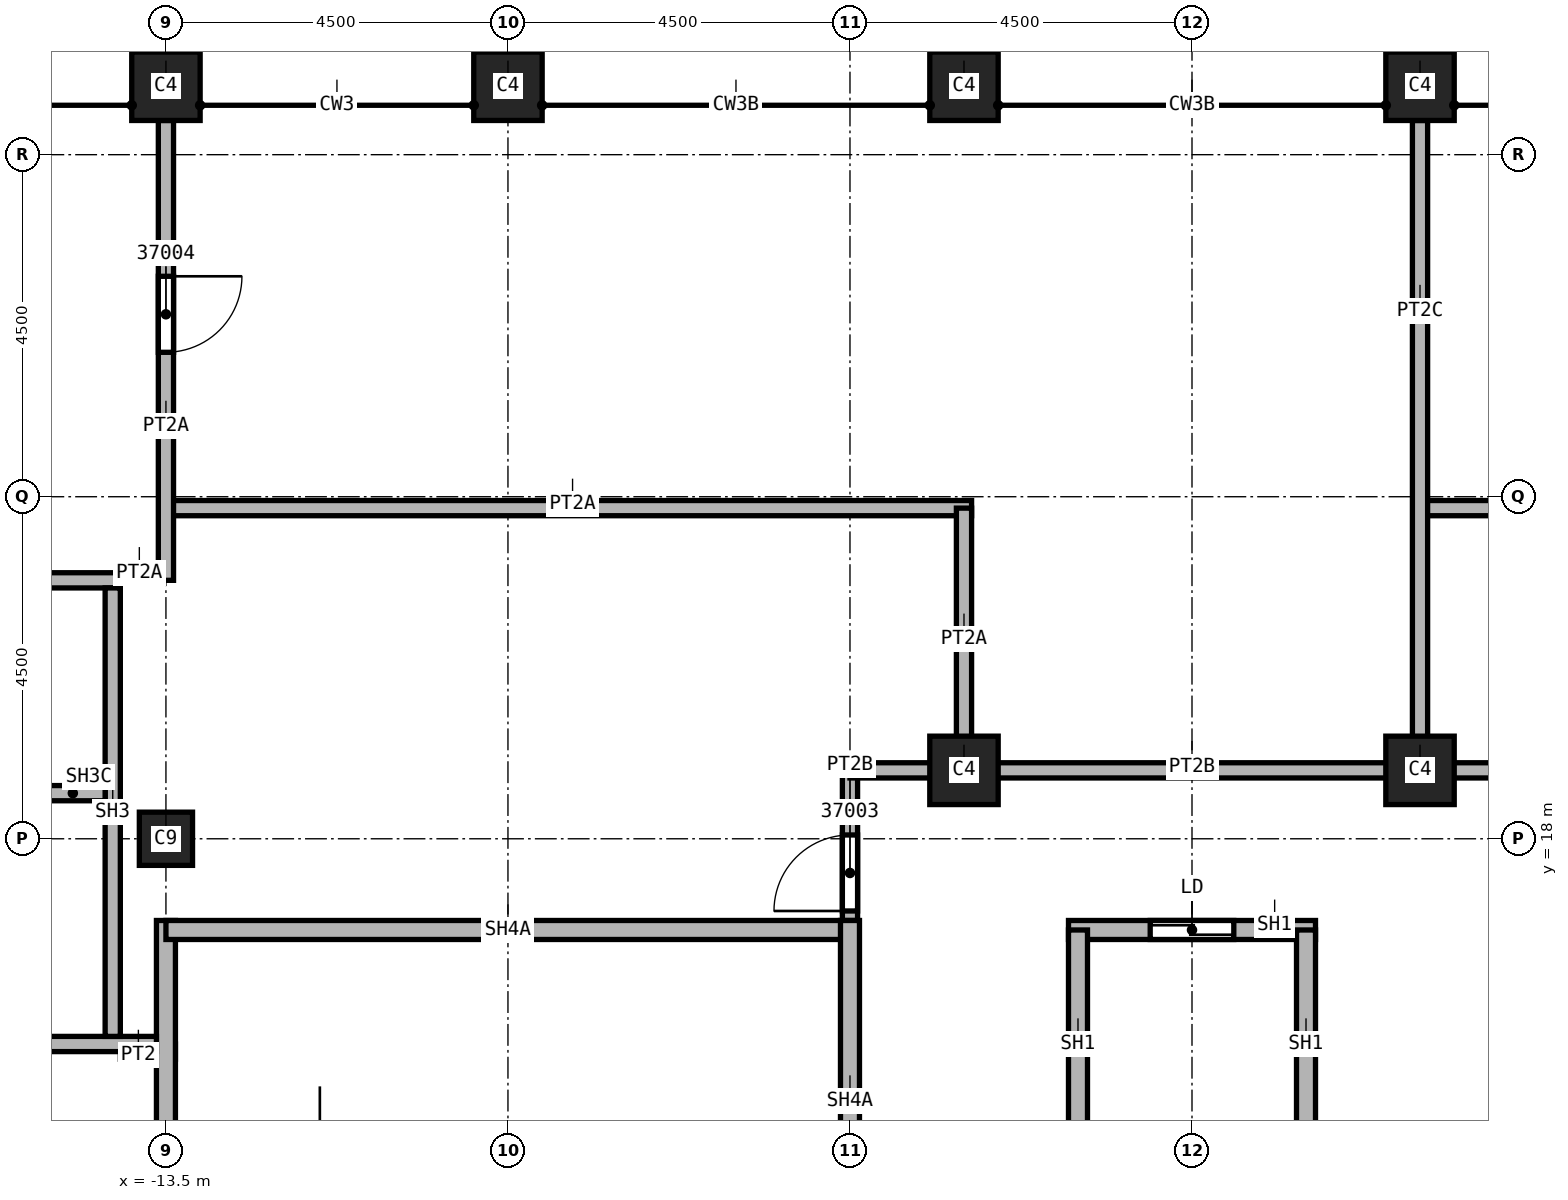
"""IFC4 building model, lengths in metres.
Left out: names, types, materials, properties, quantities, classifications, styles, units other than length and angle.
Written with IfcOpenShell. Run it as: python <this file> out.ifc"""

import sys

from ifc_helpers import new_model, si_unit, direction, frame, frame_2d, origin, origin_2d, place, context, subcontext, project, spatial, rectangle, extrude, element, fill, save


model = new_model("IFC4")
c1 = context("Model", 3, precision=1e-05, world=origin(), true_north=direction((0.0, 1.0)))
c2 = subcontext(c1, "Body", "Model", "MODEL_VIEW")
j1 = project(units=[si_unit("LENGTHUNIT", "METRE"), si_unit("PLANEANGLEUNIT", "RADIAN")], contexts=[c1])
p1 = place(None, origin())
s1 = spatial("IfcSite", under=j1, at=p1, CompositionType="ELEMENT")
p2 = place(p1, origin())
s2 = spatial("IfcBuilding", under=s1, at=p2, CompositionType="ELEMENT")
p3 = place(p2, frame((0.0, 0.0, 386.0)))
s3 = spatial("IfcBuildingStorey", under=s2, at=p3, CompositionType="ELEMENT", Elevation=386.0)
p4 = place(p3, frame((-13.5, 18.0, 0.0), z_axis=(0.0, 0.0, 1.0), x_axis=(1.0, 0.0, 0.0)))
e1 = element("IfcColumn", 1, at=p4, inside=s3, PredefinedType="COLUMN", context=c2, shape_type="SweptSolid", body=[
    extrude(rectangle(XDim=0.7, YDim=0.7, at=origin_2d()), origin(), (0.0, 0.0, 1.0), 5.0),
])
for number, where, z_axis, x_axis in (
    (2, (3.0, 27.9, 0.0), (0.0, 0.0, 1.0), (1.0, 0.0, 0.0)),
    (3, (-3.0, 27.9, 0.0), (0.0, 0.0, 1.0), (1.0, 0.0, 0.0)),
    (4, (-9.0, 27.9, 0.0), (0.0, 0.0, 1.0), (1.0, 0.0, 0.0)),
    (5, (-13.5, 27.9, 0.0), (0.0, 0.0, 1.0), (1.0, 0.0, 0.0)),
    (6, (3.0, 18.9, 0.0), (0.0, 0.0, 1.0), (1.0, 0.0, 0.0)),
    (7, (-3.0, 18.9, 0.0), (0.0, 0.0, 1.0), (1.0, 0.0, 0.0)),
):
    element("IfcColumn", number, at=place(p3, frame(where, z_axis=z_axis, x_axis=x_axis)), inside=s3, PredefinedType="COLUMN", context=c2, shape_type="SweptSolid", body=[
        extrude(rectangle(XDim=0.9, YDim=0.9, at=origin_2d()), origin(), (0.0, 0.0, 1.0), 5.0),
    ])
p5 = place(p3, frame((-14.1, 15.2, 0.0), z_axis=(0.0, 0.0, 1.0), x_axis=(1.0, 0.0, 0.0)))
e8 = element("IfcWall", 8, at=p5, inside=s3, PredefinedType="PARTITIONING", context=c2, shape_type="SweptSolid", body=[
    extrude(rectangle(XDim=0.725, YDim=0.2, at=frame_2d((0.363, 0.0))), origin(), (0.0, 0.0, 1.0), 2.953),
])
p6 = place(p3, frame((-13.5, 21.5, 0.0), z_axis=(0.0, 0.0, 1.0), x_axis=(-1.0, 0.0, 0.0)))
e9 = element("IfcWall", 9, at=p6, inside=s3, PredefinedType="PARTITIONING", context=c2, shape_type="SweptSolid", body=[
    extrude(rectangle(XDim=0.6, YDim=0.2, at=frame_2d((0.3, 0.0))), origin(), (0.0, 0.0, 1.0), 5.632),
])
p7 = place(p3, frame((-13.5, 22.35, 0.0), z_axis=(0.0, 0.0, 1.0), x_axis=(1.0, 0.0, 0.0)))
e10 = element("IfcWall", 10, at=p7, inside=s3, PredefinedType="PARTITIONING", context=c2, shape_type="SweptSolid", body=[
    extrude(rectangle(XDim=10.6, YDim=0.2, at=frame_2d((5.3, 0.0))), origin(), (0.0, 0.0, 1.0), 5.632),
])
p8 = place(p3, frame((-13.5, 27.45, 0.0), z_axis=(0.0, 0.0, 1.0), x_axis=(0.0, -1.0, 0.0)))
e11 = element("IfcWall", 11, at=p8, inside=s3, PredefinedType="PARTITIONING", context=c2, shape_type="SweptSolid", body=[
    extrude(rectangle(XDim=6.05, YDim=0.2, at=frame_2d((3.025, 0.0))), origin(), (0.0, 0.0, 1.0), 5.632),
])
p9 = place(p8, frame((2.05, 0.0, 0.0)))
e12 = element("IfcOpeningElement", 12, at=p9, cuts=e11, PredefinedType="OPENING", context=c2, shape_type="SweptSolid", body=[
    extrude(rectangle(XDim=1.0, YDim=2.1, at=frame_2d((0.5, 1.05))), frame((0.0, 0.1, 0.0), z_axis=(0.0, -1.0, 0.0), x_axis=(1.0, 0.0, 0.0)), (0.0, 0.0, 1.0), 0.2),
])
p10 = place(p3, frame((-4.5, 16.8, 0.0), z_axis=(0.0, 0.0, 1.0), x_axis=(0.0, 1.0, 0.0)))
e13 = element("IfcWall", 13, at=p10, inside=s3, PredefinedType="PARTITIONING", context=c2, shape_type="SweptSolid", body=[
    extrude(rectangle(XDim=2.2, YDim=0.2, at=frame_2d((1.1, 0.0))), origin(), (0.0, 0.0, 1.0), 4.281),
])
p11 = place(p10, frame((0.25, 0.0, 0.0)))
e14 = element("IfcOpeningElement", 14, at=p11, cuts=e13, PredefinedType="OPENING", context=c2, shape_type="SweptSolid", body=[
    extrude(rectangle(XDim=1.0, YDim=2.1, at=frame_2d((0.5, 1.05))), frame((0.0, 0.1, 0.0), z_axis=(0.0, -1.0, 0.0), x_axis=(1.0, 0.0, 0.0)), (0.0, 0.0, 1.0), 0.2),
])
p12 = place(p3, frame((-4.5, 18.9, 0.0), z_axis=(0.0, 0.0, 1.0), x_axis=(1.0, 0.0, 0.0)))
e15 = element("IfcWall", 15, at=p12, inside=s3, PredefinedType="PARTITIONING", context=c2, shape_type="SweptSolid", body=[
    extrude(rectangle(XDim=9.1, YDim=0.2, at=frame_2d((4.55, 0.0))), origin(), (0.0, 0.0, 1.0), 4.281),
])
p13 = place(p3, frame((-3.0, 22.35, 0.0), z_axis=(0.0, 0.0, 1.0), x_axis=(0.0, -1.0, 0.0)))
e16 = element("IfcWall", 16, at=p13, inside=s3, PredefinedType="PARTITIONING", context=c2, shape_type="SweptSolid", body=[
    extrude(rectangle(XDim=3.45, YDim=0.2, at=frame_2d((1.725, 0.0))), origin(), (0.0, 0.0, 1.0), 5.632),
])
p14 = place(p3, frame((3.0, 22.35, 0.0), z_axis=(0.0, 0.0, 1.0), x_axis=(1.0, 0.0, 0.0)))
e17 = element("IfcWall", 17, at=p14, inside=s3, PredefinedType="PARTITIONING", context=c2, shape_type="SweptSolid", body=[
    extrude(rectangle(XDim=10.5, YDim=0.2, at=frame_2d((5.25, 0.0))), origin(), (0.0, 0.0, 1.0), 6.378),
])
p15 = place(p3, frame((3.0, 27.45, 0.0), z_axis=(0.0, 0.0, 1.0), x_axis=(0.0, -1.0, 0.0)))
e18 = element("IfcWall", 18, at=p15, inside=s3, PredefinedType="PARTITIONING", context=c2, shape_type="SweptSolid", body=[
    extrude(rectangle(XDim=8.55, YDim=0.2, at=frame_2d((4.275, 0.0))), origin(), (0.0, 0.0, 1.0), 6.378),
])
p16 = place(p3, frame((-1.625, 16.8, 0.0), z_axis=(0.0, 0.0, 1.0), x_axis=(1.0, 0.0, 0.0)))
e19 = element("IfcWall", 19, at=p16, inside=s3, PredefinedType="SOLIDWALL", context=c2, shape_type="SweptSolid", body=[
    extrude(rectangle(XDim=3.25, YDim=0.25, at=frame_2d((1.625, 0.0))), origin(), (0.0, 0.0, 1.0), 4.281),
])
p17 = place(p16, frame((1.075, 0.0, 0.0)))
e20 = element("IfcOpeningElement", 20, at=p17, cuts=e19, PredefinedType="OPENING", context=c2, shape_type="SweptSolid", body=[
    extrude(rectangle(XDim=1.1, YDim=2.1, at=frame_2d((0.55, 1.05))), frame((0.0, 0.125, 0.0), z_axis=(0.0, -1.0, 0.0), x_axis=(1.0, 0.0, 0.0)), (0.0, 0.0, 1.0), 0.25),
])
p18 = place(p3, frame((-1.5, 13.8, 0.0), z_axis=(0.0, 0.0, 1.0), x_axis=(0.0, 1.0, 0.0)))
e21 = element("IfcWall", 21, at=p18, inside=s3, PredefinedType="SOLIDWALL", context=c2, shape_type="SweptSolid", body=[
    extrude(rectangle(XDim=3.0, YDim=0.25, at=frame_2d((1.5, 0.0))), origin(), (0.0, 0.0, 1.0), 4.281),
])
p19 = place(p3, frame((1.5, 16.8, 0.0), z_axis=(0.0, 0.0, 1.0), x_axis=(0.0, -1.0, 0.0)))
e22 = element("IfcWall", 22, at=p19, inside=s3, PredefinedType="SOLIDWALL", context=c2, shape_type="SweptSolid", body=[
    extrude(rectangle(XDim=3.125, YDim=0.25, at=frame_2d((1.562, 0.0))), origin(), (0.0, 0.0, 1.0), 4.281),
])
p20 = place(p3, frame((-13.5, 12.175, 0.0), z_axis=(0.0, 0.0, 1.0), x_axis=(0.0, 1.0, 0.0)))
e23 = element("IfcWall", 23, at=p20, inside=s3, PredefinedType="SOLIDWALL", context=c2, shape_type="SweptSolid", body=[
    extrude(rectangle(XDim=4.75, YDim=0.25, at=frame_2d((2.375, 0.0))), origin(), (0.0, 0.0, 1.0), 2.953),
])
p21 = place(p3, frame((-13.5, 16.8, 0.0), z_axis=(0.0, 0.0, 1.0), x_axis=(1.0, 0.0, 0.0)))
e24 = element("IfcWall", 24, at=p21, inside=s3, PredefinedType="SOLIDWALL", context=c2, shape_type="SweptSolid", body=[
    extrude(rectangle(XDim=9.1, YDim=0.25, at=frame_2d((4.55, 0.0))), origin(), (0.0, 0.0, 1.0), 4.281),
])
p22 = place(p3, frame((-4.5, 16.925, 0.0), z_axis=(0.0, 0.0, 1.0), x_axis=(0.0, -1.0, 0.0)))
e25 = element("IfcWall", 25, at=p22, inside=s3, PredefinedType="SOLIDWALL", context=c2, shape_type="SweptSolid", body=[
    extrude(rectangle(XDim=4.625, YDim=0.25, at=frame_2d((2.312, 0.0))), origin(), (0.0, 0.0, 1.0), 4.281),
])
p23 = place(p3, frame((-21.9, 15.3, 0.0), z_axis=(0.0, 0.0, 1.0), x_axis=(1.0, 0.0, 0.0)))
e26 = element("IfcWall", 26, at=p23, inside=s3, PredefinedType="SOLIDWALL", context=c2, shape_type="SweptSolid", body=[
    extrude(rectangle(XDim=8.275, YDim=0.2, at=frame_2d((4.137, 0.0))), origin(), (0.0, 0.0, 1.0), 5.679),
])
p24 = place(p23, frame((4.8, 0.0, 0.0)))
e27 = element("IfcOpeningElement", 27, at=p24, cuts=e26, PredefinedType="OPENING", context=c2, shape_type="SweptSolid", body=[
    extrude(rectangle(XDim=1.2, YDim=2.1, at=frame_2d((0.6, 1.05))), frame((0.0, 0.1, 0.0), z_axis=(0.0, -1.0, 0.0), x_axis=(1.0, 0.0, 0.0)), (0.0, 0.0, 1.0), 0.2),
])
p25 = place(p3, frame((-21.9, 21.4, 0.0), z_axis=(0.0, 0.0, 1.0), x_axis=(1.0, 0.0, 0.0)))
e28 = element("IfcWall", 28, at=p25, inside=s3, PredefinedType="SOLIDWALL", context=c2, shape_type="SweptSolid", body=[
    extrude(rectangle(XDim=7.8, YDim=0.2, at=frame_2d((3.9, 0.0))), origin(), (0.0, 0.0, 1.0), 8.521),
])
p26 = place(p25, frame((3.2, 0.0, 0.0)))
e29 = element("IfcOpeningElement", 29, at=p26, cuts=e28, PredefinedType="OPENING", context=c2, shape_type="SweptSolid", body=[
    extrude(rectangle(XDim=1.2, YDim=2.1, at=frame_2d((0.6, 1.05))), frame((0.0, 0.1, 0.0), z_axis=(0.0, -1.0, 0.0), x_axis=(1.0, 0.0, 0.0)), (0.0, 0.0, 1.0), 0.2),
])
p27 = place(p3, frame((-14.2, 15.4, 0.0), z_axis=(0.0, 0.0, 1.0), x_axis=(0.0, 1.0, 0.0)))
e30 = element("IfcWall", 30, at=p27, inside=s3, PredefinedType="SOLIDWALL", context=c2, shape_type="SweptSolid", body=[
    extrude(rectangle(XDim=5.9, YDim=0.2, at=frame_2d((2.95, 0.0))), origin(), (0.0, 0.0, 1.0), 5.726),
])
p28 = place(p3, frame((-17.1, 18.6, 0.0), z_axis=(0.0, 0.0, 1.0), x_axis=(1.0, 0.0, 0.0)))
e31 = element("IfcWall", 31, at=p28, inside=s3, PredefinedType="SOLIDWALL", context=c2, shape_type="SweptSolid", body=[
    extrude(rectangle(XDim=2.8, YDim=0.2, at=frame_2d((1.4, 0.0))), origin(), (0.0, 0.0, 1.0), 7.217),
])
p29 = place(p28, frame((0.85, 0.0, 0.0)))
e32 = element("IfcOpeningElement", 32, at=p29, cuts=e31, PredefinedType="OPENING", context=c2, shape_type="SweptSolid", body=[
    extrude(rectangle(XDim=1.1, YDim=2.1, at=frame_2d((0.55, 1.05))), frame((0.0, 0.1, 0.0), z_axis=(0.0, -1.0, 0.0), x_axis=(1.0, 0.0, 0.0)), (0.0, 0.0, 1.0), 0.2),
])
p30 = place(p11, origin())
e33 = element("IfcDoor", 33, at=p30, inside=s3, OperationType="SINGLE_SWING_RIGHT", PredefinedType="DOOR", context=c2, shape_type="SweptSolid", body=[
    extrude(rectangle(XDim=1.0, YDim=2.1, at=frame_2d((0.5, 1.05))), frame((0.0, 0.025, 0.0), z_axis=(0.0, -1.0, 0.0), x_axis=(1.0, 0.0, 0.0)), (0.0, 0.0, 1.0), 0.05),
])
fill(e14, e33)
p31 = place(p9, origin())
e34 = element("IfcDoor", 34, at=p31, inside=s3, OperationType="SINGLE_SWING_LEFT", PredefinedType="DOOR", context=c2, shape_type="SweptSolid", body=[
    extrude(rectangle(XDim=1.0, YDim=2.1, at=frame_2d((0.5, 1.05))), frame((0.0, 0.025, 0.0), z_axis=(0.0, -1.0, 0.0), x_axis=(1.0, 0.0, 0.0)), (0.0, 0.0, 1.0), 0.05),
])
fill(e12, e34)
p32 = place(p17, origin())
e35 = element("IfcDoor", 35, at=p32, inside=s3, OperationType="SLIDING_TO_LEFT", PredefinedType="DOOR", context=c2, shape_type="SweptSolid", body=[
    extrude(rectangle(XDim=1.1, YDim=2.1, at=frame_2d((0.55, 1.05))), frame((0.0, 0.025, 0.0), z_axis=(0.0, -1.0, 0.0), x_axis=(1.0, 0.0, 0.0)), (0.0, 0.0, 1.0), 0.05),
])
fill(e20, e35)
save(model, sys.argv[1])
